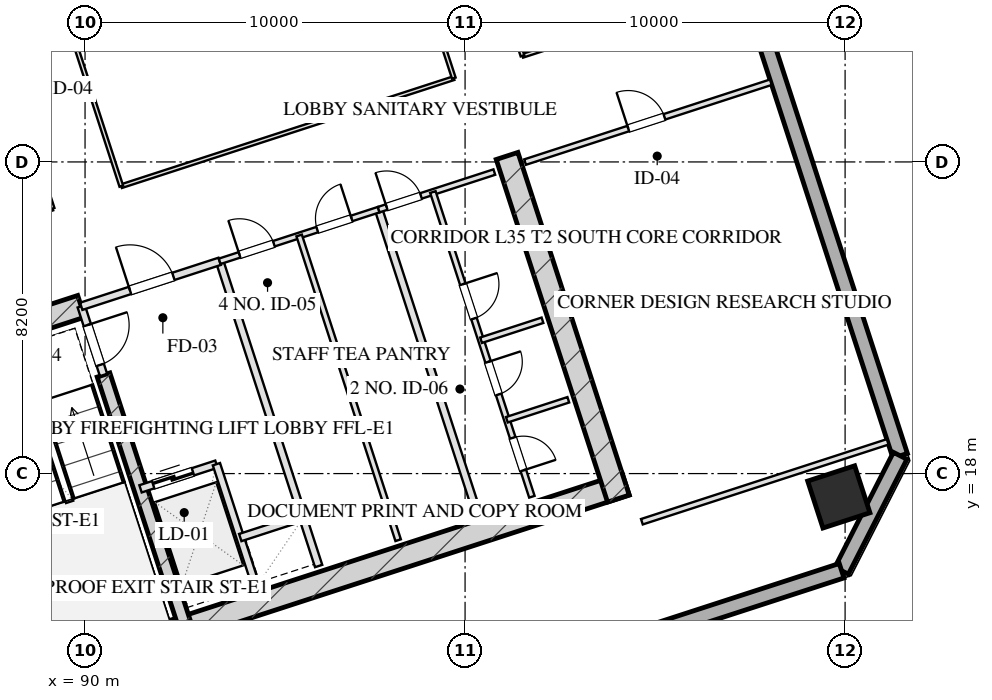
"""IFC4 building model, lengths in metres.
Left out: names, types, materials, properties, quantities, classifications, styles, units other than length and angle.
Written with IfcOpenShell. Run it as: python <this file> out.ifc"""

import sys

from ifc_helpers import new_model, si_unit, direction, frame, frame_2d, origin, origin_2d, place, context, subcontext, project, spatial, rectangle, hollow_rectangle, extrude, element, fill, save


model = new_model("IFC4")
c1 = context("Model", 3, precision=1e-05, world=origin(), true_north=direction((0.0, 1.0)))
c2 = subcontext(c1, "Body", "Model", "MODEL_VIEW")
j1 = project(units=[si_unit("LENGTHUNIT", "METRE"), si_unit("PLANEANGLEUNIT", "RADIAN")], contexts=[c1])
p1 = place(None, origin())
s1 = spatial("IfcSite", under=j1, at=p1, CompositionType="ELEMENT")
p2 = place(p1, origin())
s2 = spatial("IfcBuilding", under=s1, at=p2, CompositionType="ELEMENT")
p3 = place(p2, frame((0.0, 0.0, 134.55)))
s3 = spatial("IfcBuildingStorey", under=s2, at=p3, CompositionType="ELEMENT", Elevation=134.55)
p4 = place(p3, frame((88.63, 12.652, 0.0), z_axis=(0.0, 0.0, 1.0), x_axis=(0.95105714907, 0.309015046886, 0.0)))
e1 = element("IfcWall", 1, at=p4, inside=s3, PredefinedType="SHEAR", context=c2, shape_type="SweptSolid", body=[
    extrude(rectangle(XDim=16.4, YDim=0.6, at=frame_2d((8.2, 0.0))), origin(), (0.0, 0.0, 1.0), 3.45),
])
p5 = place(p3, frame((86.078, 21.475, 0.0), z_axis=(0.0, 0.0, 1.0), x_axis=(0.309017938678, -0.951056209472, 0.0)))
e2 = element("IfcWall", 2, at=p5, inside=s3, PredefinedType="SHEAR", context=c2, shape_type="SweptSolid", body=[
    extrude(rectangle(XDim=9.48, YDim=0.6, at=frame_2d((4.74, 0.0))), origin(), (0.0, 0.0, 1.0), 3.45),
])
p6 = place(p3, frame((101.105, 26.358, 0.0), z_axis=(0.0, 0.0, 1.0), x_axis=(0.309010370028, -0.95105866865, 0.0)))
e3 = element("IfcWall", 3, at=p6, inside=s3, PredefinedType="SHEAR", context=c2, shape_type="SweptSolid", body=[
    extrude(rectangle(XDim=9.48, YDim=0.6, at=frame_2d((4.74, 0.0))), origin(), (0.0, 0.0, 1.0), 3.45),
])
p7 = place(p3, frame((90.486, 20.594, 0.0), z_axis=(0.0, 0.0, 1.0), x_axis=(0.309020428229, -0.951055400562, 0.0)))
e4 = element("IfcWall", 4, at=p7, inside=s3, PredefinedType="SHEAR", context=c2, shape_type="SweptSolid", body=[
    extrude(rectangle(XDim=6.98, YDim=0.35, at=frame_2d((3.49, 0.0))), origin(), (0.0, 0.0, 1.0), 3.45),
])
p8 = place(p3, frame((85.886, 21.097, 0.0), z_axis=(0.0, 0.0, 1.0), x_axis=(0.951068073652, 0.308981422225, 0.0)))
e5 = element("IfcWall", 5, at=p8, inside=s3, PredefinedType="SHEAR", context=c2, shape_type="SweptSolid", body=[
    extrude(rectangle(XDim=4.22, YDim=0.6, at=frame_2d((2.11, 0.0))), origin(), (0.0, 0.0, 1.0), 3.45),
])
p9 = place(p3, frame((109.835, 17.386, 0.0), z_axis=(0.0, 0.0, 1.0), x_axis=(0.951056516295, 0.309016994375, 0.0)))
e6 = element("IfcColumn", 6, at=p9, inside=s3, PredefinedType="COLUMN", context=c2, shape_type="SweptSolid", body=[
    extrude(hollow_rectangle(XDim=1.3, YDim=1.3, WallThickness=0.045, at=origin_2d()), origin(), (0.0, 0.0, 1.0), 3.451),
])
p10 = place(p3, frame((98.224, 59.173, 0.0), z_axis=(0.0, 0.0, 1.0), x_axis=(0.309014228706, -0.951057414911, 0.0)))
e7 = element("IfcWall", 7, at=p10, inside=s3, PredefinedType="SOLIDWALL", context=c2, shape_type="SweptSolid", body=[
    extrude(rectangle(XDim=42.8, YDim=0.4, at=frame_2d((21.4, 0.0))), origin(), (0.0, 0.0, 1.0), 2.55),
])
p11 = place(p10, frame((18.25, 0.0, 0.0)))
e8 = element("IfcOpeningElement", 8, at=p11, cuts=e7, PredefinedType="OPENING", context=c2, shape_type="SweptSolid", body=[
    extrude(rectangle(XDim=1.1, YDim=2.15, at=frame_2d((0.55, 1.075))), frame((0.0, 0.21, 0.0), z_axis=(0.0, -1.0, 0.0), x_axis=(1.0, 0.0, 0.0)), (0.0, 0.0, 1.0), 0.42),
])
p12 = place(p3, frame((111.449, 18.468, 0.0), z_axis=(0.0, 0.0, 1.0), x_axis=(-0.454019523198, -0.890991735402, 0.0)))
e9 = element("IfcWall", 9, at=p12, inside=s3, PredefinedType="SOLIDWALL", context=c2, shape_type="SweptSolid", body=[
    extrude(rectangle(XDim=3.394, YDim=0.4, at=frame_2d((1.697, 0.0))), origin(), (0.0, 0.0, 1.0), 2.55),
])
p13 = place(p3, frame((109.908, 15.444, 0.0), z_axis=(0.0, 0.0, 1.0), x_axis=(-0.951057580055, -0.30901372044, 0.0)))
e10 = element("IfcWall", 10, at=p13, inside=s3, PredefinedType="SOLIDWALL", context=c2, shape_type="SweptSolid", body=[
    extrude(rectangle(XDim=26.4, YDim=0.4, at=frame_2d((13.2, 0.0))), origin(), (0.0, 0.0, 1.0), 2.55),
])
p14 = place(p3, frame((89.899, 22.401, 0.0), z_axis=(0.0, 0.0, 1.0), x_axis=(0.308932062672, -0.951084108086, 0.0)))
e11 = element("IfcWall", 11, at=p14, inside=s3, PredefinedType="PARTITIONING", context=c2, shape_type="SweptSolid", body=[
    extrude(rectangle(XDim=1.9, YDim=0.2, at=frame_2d((0.95, 0.0))), origin(), (0.0, 0.0, 1.0), 3.155),
])
p15 = place(p14, frame((0.52, 0.0, 0.0)))
e12 = element("IfcOpeningElement", 12, at=p15, cuts=e11, PredefinedType="OPENING", context=c2, shape_type="SweptSolid", body=[
    extrude(rectangle(XDim=1.1, YDim=2.05, at=frame_2d((0.55, 1.025))), frame((0.0, 0.11, 0.0), z_axis=(0.0, -1.0, 0.0), x_axis=(1.0, 0.0, 0.0)), (0.0, 0.0, 1.0), 0.22),
])
p16 = place(p3, frame((93.542, 23.585, 0.0), z_axis=(0.0, 0.0, 1.0), x_axis=(0.309042196757, -0.951048327176, 0.0)))
e13 = element("IfcWall", 13, at=p16, inside=s3, PredefinedType="PARTITIONING", context=c2, shape_type="SweptSolid", body=[
    extrude(rectangle(XDim=8.43, YDim=0.2, at=frame_2d((4.215, 0.0))), origin(), (0.0, 0.0, 1.0), 3.155),
])
p17 = place(p3, frame((89.899, 22.401, 0.0), z_axis=(0.0, 0.0, 1.0), x_axis=(0.951046716504, 0.309047153403, 0.0)))
e14 = element("IfcWall", 14, at=p17, inside=s3, PredefinedType="PARTITIONING", context=c2, shape_type="SweptSolid", body=[
    extrude(rectangle(XDim=3.83, YDim=0.2, at=frame_2d((1.915, 0.0))), origin(), (0.0, 0.0, 1.0), 3.155),
])
p18 = place(p17, frame((1.35, 0.0, 0.0)))
e15 = element("IfcOpeningElement", 15, at=p18, cuts=e14, PredefinedType="OPENING", context=c2, shape_type="SweptSolid", body=[
    extrude(rectangle(XDim=1.2, YDim=2.05, at=frame_2d((0.6, 1.025))), frame((0.0, 0.11, 0.0), z_axis=(0.0, -1.0, 0.0), x_axis=(1.0, 0.0, 0.0)), (0.0, 0.0, 1.0), 0.22),
])
p19 = place(p3, frame((91.46, 17.598, 0.0), z_axis=(0.0, 0.0, 1.0), x_axis=(0.951062257173, 0.308999325213, 0.0)))
e16 = element("IfcWall", 16, at=p19, inside=s3, PredefinedType="PARTITIONING", context=c2, shape_type="SweptSolid", body=[
    extrude(rectangle(XDim=2.1, YDim=0.2, at=frame_2d((1.05, 0.0))), origin(), (0.0, 0.0, 1.0), 3.155),
])
p20 = place(p19, frame((0.35, 0.0, 0.0)))
e17 = element("IfcOpeningElement", 17, at=p20, cuts=e16, PredefinedType="OPENING", context=c2, shape_type="SweptSolid", body=[
    extrude(rectangle(XDim=1.1, YDim=2.05, at=frame_2d((0.55, 1.025))), frame((0.0, 0.11, 0.0), z_axis=(0.0, -1.0, 0.0), x_axis=(1.0, 0.0, 0.0)), (0.0, 0.0, 1.0), 0.22),
])
p21 = place(p3, frame((93.457, 18.247, 0.0), z_axis=(0.0, 0.0, 1.0), x_axis=(0.3089935693, -0.951064127245, 0.0)))
e18 = element("IfcWall", 18, at=p21, inside=s3, PredefinedType="PARTITIONING", context=c2, shape_type="SweptSolid", body=[
    extrude(rectangle(XDim=3.7, YDim=0.2, at=frame_2d((1.85, 0.0))), origin(), (0.0, 0.0, 1.0), 3.155),
])
p22 = place(p3, frame((94.084, 16.317, 0.0), z_axis=(0.0, 0.0, 1.0), x_axis=(0.951041328149, 0.309063734775, 0.0)))
e19 = element("IfcWall", 19, at=p22, inside=s3, PredefinedType="PARTITIONING", context=c2, shape_type="SweptSolid", body=[
    extrude(rectangle(XDim=1.73, YDim=0.2, at=frame_2d((0.865, 0.0))), origin(), (0.0, 0.0, 1.0), 3.155),
])
p23 = place(p3, frame((97.727, 24.944, 0.0), z_axis=(0.0, 0.0, 1.0), x_axis=(0.309016001439, -0.951056838919, 0.0)))
e20 = element("IfcWall", 20, at=p23, inside=s3, PredefinedType="PARTITIONING", context=c2, shape_type="SweptSolid", body=[
    extrude(rectangle(XDim=8.43, YDim=0.2, at=frame_2d((4.215, 0.0))), origin(), (0.0, 0.0, 1.0), 3.155),
])
p24 = place(p3, frame((93.542, 23.585, 0.0), z_axis=(0.0, 0.0, 1.0), x_axis=(0.951063829732, 0.308994485023, 0.0)))
e21 = element("IfcWall", 21, at=p24, inside=s3, PredefinedType="PARTITIONING", context=c2, shape_type="SweptSolid", body=[
    extrude(rectangle(XDim=4.4, YDim=0.15, at=frame_2d((2.2, 0.0))), origin(), (0.0, 0.0, 1.0), 3.155),
])
p25 = place(p24, frame((0.55, 0.0, 0.0)))
e22 = element("IfcOpeningElement", 22, at=p25, cuts=e21, PredefinedType="OPENING", context=c2, shape_type="SweptSolid", body=[
    extrude(rectangle(XDim=0.95, YDim=2.05, at=frame_2d((0.475, 1.025))), frame((0.0, 0.085, 0.0), z_axis=(0.0, -1.0, 0.0), x_axis=(1.0, 0.0, 0.0)), (0.0, 0.0, 1.0), 0.17),
])
p26 = place(p24, frame((2.7, 0.0, 0.0)))
e23 = element("IfcOpeningElement", 23, at=p26, cuts=e21, PredefinedType="OPENING", context=c2, shape_type="SweptSolid", body=[
    extrude(rectangle(XDim=0.95, YDim=2.05, at=frame_2d((0.475, 1.025))), frame((0.0, 0.085, 0.0), z_axis=(0.0, -1.0, 0.0), x_axis=(1.0, 0.0, 0.0)), (0.0, 0.0, 1.0), 0.17),
])
p27 = place(p3, frame((95.634, 24.265, 0.0), z_axis=(0.0, 0.0, 1.0), x_axis=(0.309007490203, -0.951059604335, 0.0)))
e24 = element("IfcWall", 24, at=p27, inside=s3, PredefinedType="PARTITIONING", context=c2, shape_type="SweptSolid", body=[
    extrude(rectangle(XDim=8.43, YDim=0.15, at=frame_2d((4.215, 0.0))), origin(), (0.0, 0.0, 1.0), 3.155),
])
p28 = place(p3, frame((97.727, 24.944, 0.0), z_axis=(0.0, 0.0, 1.0), x_axis=(0.951036872128, 0.309077446369, 0.0)))
e25 = element("IfcWall", 25, at=p28, inside=s3, PredefinedType="PARTITIONING", context=c2, shape_type="SweptSolid", body=[
    extrude(rectangle(XDim=3.2, YDim=0.15, at=frame_2d((1.6, 0.0))), origin(), (0.0, 0.0, 1.0), 3.155),
])
p29 = place(p28, frame((0.22, 0.0, 0.0)))
e26 = element("IfcOpeningElement", 26, at=p29, cuts=e25, PredefinedType="OPENING", context=c2, shape_type="SweptSolid", body=[
    extrude(rectangle(XDim=0.95, YDim=2.05, at=frame_2d((0.475, 1.025))), frame((0.0, 0.085, 0.0), z_axis=(0.0, -1.0, 0.0), x_axis=(1.0, 0.0, 0.0)), (0.0, 0.0, 1.0), 0.17),
])
p30 = place(p3, frame((99.153, 25.408, 0.0), z_axis=(0.0, 0.0, 1.0), x_axis=(0.309016001439, -0.951056838919, 0.0)))
e27 = element("IfcWall", 27, at=p30, inside=s3, PredefinedType="PARTITIONING", context=c2, shape_type="SweptSolid", body=[
    extrude(rectangle(XDim=8.43, YDim=0.15, at=frame_2d((4.215, 0.0))), origin(), (0.0, 0.0, 1.0), 3.155),
])
p31 = place(p30, frame((2.55, 0.0, 0.0)))
e28 = element("IfcOpeningElement", 28, at=p31, cuts=e27, PredefinedType="OPENING", context=c2, shape_type="SweptSolid", body=[
    extrude(rectangle(XDim=0.95, YDim=2.05, at=frame_2d((0.475, 1.025))), frame((0.0, 0.085, 0.0), z_axis=(0.0, -1.0, 0.0), x_axis=(1.0, 0.0, 0.0)), (0.0, 0.0, 1.0), 0.17),
])
p32 = place(p30, frame((4.7, 0.0, 0.0)))
e29 = element("IfcOpeningElement", 29, at=p32, cuts=e27, PredefinedType="OPENING", context=c2, shape_type="SweptSolid", body=[
    extrude(rectangle(XDim=0.9, YDim=2.05, at=frame_2d((0.45, 1.025))), frame((0.0, 0.085, 0.0), z_axis=(0.0, -1.0, 0.0), x_axis=(1.0, 0.0, 0.0)), (0.0, 0.0, 1.0), 0.17),
])
p33 = place(p30, frame((6.8, 0.0, 0.0)))
e30 = element("IfcOpeningElement", 30, at=p33, cuts=e27, PredefinedType="OPENING", context=c2, shape_type="SweptSolid", body=[
    extrude(rectangle(XDim=0.9, YDim=2.05, at=frame_2d((0.45, 1.025))), frame((0.0, 0.085, 0.0), z_axis=(0.0, -1.0, 0.0), x_axis=(1.0, 0.0, 0.0)), (0.0, 0.0, 1.0), 0.17),
])
p34 = place(p3, frame((100.42, 21.509, 0.0), z_axis=(0.0, 0.0, 1.0), x_axis=(0.951040401051, 0.309066587596, 0.0)))
e31 = element("IfcWall", 31, at=p34, inside=s3, PredefinedType="PARTITIONING", context=c2, shape_type="SweptSolid", body=[
    extrude(rectangle(XDim=1.7, YDim=0.15, at=frame_2d((0.85, 0.0))), origin(), (0.0, 0.0, 1.0), 3.155),
])
p35 = place(p3, frame((101.1, 19.416, 0.0), z_axis=(0.0, 0.0, 1.0), x_axis=(0.951054116971, 0.309024378638, 0.0)))
e32 = element("IfcWall", 32, at=p35, inside=s3, PredefinedType="PARTITIONING", context=c2, shape_type="SweptSolid", body=[
    extrude(rectangle(XDim=1.7, YDim=0.15, at=frame_2d((0.85, 0.0))), origin(), (0.0, 0.0, 1.0), 3.155),
])
p36 = place(p3, frame((104.653, 16.733, 0.0), z_axis=(0.0, 0.0, 1.0), x_axis=(0.951054383043, 0.309023559774, 0.0)))
e33 = element("IfcWall", 33, at=p36, inside=s3, PredefinedType="PARTITIONING", context=c2, shape_type="SweptSolid", body=[
    extrude(rectangle(XDim=6.8, YDim=0.15, at=frame_2d((3.4, 0.0))), origin(), (0.0, 0.0, 1.0), 3.155),
])
p37 = place(p3, frame((101.578, 26.196, 0.0), z_axis=(0.0, 0.0, 1.0), x_axis=(0.951064934653, 0.308991084134, 0.0)))
e34 = element("IfcWall", 34, at=p37, inside=s3, PredefinedType="PARTITIONING", context=c2, shape_type="SweptSolid", body=[
    extrude(rectangle(XDim=6.8, YDim=0.15, at=frame_2d((3.4, 0.0))), origin(), (0.0, 0.0, 1.0), 3.155),
])
p38 = place(p37, frame((2.856, 0.0, 0.0)))
e35 = element("IfcOpeningElement", 35, at=p38, cuts=e34, PredefinedType="OPENING", context=c2, shape_type="SweptSolid", body=[
    extrude(rectangle(XDim=1.0, YDim=2.05, at=frame_2d((0.5, 1.025))), frame((0.0, 0.085, 0.0), z_axis=(0.0, -1.0, 0.0), x_axis=(1.0, 0.0, 0.0)), (0.0, 0.0, 1.0), 0.17),
])
p39 = place(p3, frame((77.925, 21.328, 0.0), z_axis=(0.0, 0.0, 1.0), x_axis=(0.951053984761, 0.309024785528, 0.0)))
e36 = element("IfcWall", 36, at=p39, inside=s3, PredefinedType="MOVABLE", context=c2, shape_type="SweptSolid", body=[
    extrude(rectangle(XDim=11.8, YDim=0.1, at=frame_2d((5.9, 0.0))), origin(), (0.0, 0.0, 1.0), 3.155),
])
p40 = place(p3, frame((90.954, 25.562, 0.0), z_axis=(0.0, 0.0, 1.0), x_axis=(0.951052398814, 0.309029666393, 0.0)))
e37 = element("IfcWall", 37, at=p40, inside=s3, PredefinedType="MOVABLE", context=c2, shape_type="SweptSolid", body=[
    extrude(rectangle(XDim=9.2, YDim=0.1, at=frame_2d((4.6, 0.0))), origin(), (0.0, 0.0, 1.0), 3.155),
])
p41 = place(p3, frame((101.511, 28.992, 0.0), z_axis=(0.0, 0.0, 1.0), x_axis=(0.951048719763, 0.309040988602, 0.0)))
e38 = element("IfcWall", 38, at=p41, inside=s3, PredefinedType="MOVABLE", context=c2, shape_type="SweptSolid", body=[
    extrude(rectangle(XDim=6.0, YDim=0.1, at=frame_2d((3.0, 0.0))), origin(), (0.0, 0.0, 1.0), 3.155),
])
p42 = place(p3, frame((89.147, 24.975, 0.0), z_axis=(0.0, 0.0, 1.0), x_axis=(-0.309022042254, 0.951054876125, 0.0)))
e39 = element("IfcWall", 39, at=p42, inside=s3, PredefinedType="MOVABLE", context=c2, shape_type="SweptSolid", body=[
    extrude(rectangle(XDim=16.64, YDim=0.1, at=frame_2d((8.32, 0.0))), origin(), (0.0, 0.0, 1.0), 3.155),
])
p43 = place(p42, frame((3.32, 0.0, 0.0)))
e40 = element("IfcOpeningElement", 40, at=p43, cuts=e39, PredefinedType="OPENING", context=c2, shape_type="SweptSolid", body=[
    extrude(rectangle(XDim=1.0, YDim=2.05, at=frame_2d((0.5, 1.025))), frame((0.0, 0.06, 0.0), z_axis=(0.0, -1.0, 0.0), x_axis=(1.0, 0.0, 0.0)), (0.0, 0.0, 1.0), 0.12),
])
p44 = place(p42, frame((11.64, 0.0, 0.0)))
e41 = element("IfcOpeningElement", 41, at=p44, cuts=e39, PredefinedType="OPENING", context=c2, shape_type="SweptSolid", body=[
    extrude(rectangle(XDim=1.0, YDim=2.05, at=frame_2d((0.5, 1.025))), frame((0.0, 0.06, 0.0), z_axis=(0.0, -1.0, 0.0), x_axis=(1.0, 0.0, 0.0)), (0.0, 0.0, 1.0), 0.12),
])
p45 = place(p3, frame((90.954, 25.562, 0.0), z_axis=(0.0, 0.0, 1.0), x_axis=(-0.30901773025, 0.951056277195, 0.0)))
e42 = element("IfcWall", 42, at=p45, inside=s3, PredefinedType="MOVABLE", context=c2, shape_type="SweptSolid", body=[
    extrude(rectangle(XDim=16.64, YDim=0.1, at=frame_2d((8.32, 0.0))), origin(), (0.0, 0.0, 1.0), 3.155),
])
p46 = place(p45, frame((4.284, 0.0, 0.0)))
e43 = element("IfcOpeningElement", 43, at=p46, cuts=e42, PredefinedType="OPENING", context=c2, shape_type="SweptSolid", body=[
    extrude(rectangle(XDim=1.1, YDim=2.05, at=frame_2d((0.55, 1.025))), frame((0.0, 0.06, 0.0), z_axis=(0.0, -1.0, 0.0), x_axis=(1.0, 0.0, 0.0)), (0.0, 0.0, 1.0), 0.12),
])
p47 = place(p45, frame((12.724, 0.0, 0.0)))
e44 = element("IfcOpeningElement", 44, at=p47, cuts=e42, PredefinedType="OPENING", context=c2, shape_type="SweptSolid", body=[
    extrude(rectangle(XDim=1.1, YDim=2.05, at=frame_2d((0.55, 1.025))), frame((0.0, 0.06, 0.0), z_axis=(0.0, -1.0, 0.0), x_axis=(1.0, 0.0, 0.0)), (0.0, 0.0, 1.0), 0.12),
])
p48 = place(p3, frame((99.704, 28.405, 0.0), z_axis=(0.0, 0.0, 1.0), x_axis=(-0.309004459387, 0.951060589068, 0.0)))
e45 = element("IfcWall", 45, at=p48, inside=s3, PredefinedType="MOVABLE", context=c2, shape_type="SweptSolid", body=[
    extrude(rectangle(XDim=16.64, YDim=0.1, at=frame_2d((8.32, 0.0))), origin(), (0.0, 0.0, 1.0), 3.155),
])
p49 = place(p3, frame((101.511, 28.992, 0.0), z_axis=(0.0, 0.0, 1.0), x_axis=(-0.30901773025, 0.951056277195, 0.0)))
e46 = element("IfcWall", 46, at=p49, inside=s3, PredefinedType="MOVABLE", context=c2, shape_type="SweptSolid", body=[
    extrude(rectangle(XDim=16.64, YDim=0.1, at=frame_2d((8.32, 0.0))), origin(), (0.0, 0.0, 1.0), 3.155),
])
p50 = place(p49, frame((1.16, 0.0, 0.0)))
e47 = element("IfcOpeningElement", 47, at=p50, cuts=e46, PredefinedType="OPENING", context=c2, shape_type="SweptSolid", body=[
    extrude(rectangle(XDim=1.0, YDim=2.05, at=frame_2d((0.5, 1.025))), frame((0.0, 0.06, 0.0), z_axis=(0.0, -1.0, 0.0), x_axis=(1.0, 0.0, 0.0)), (0.0, 0.0, 1.0), 0.12),
])
p51 = place(p49, frame((6.16, 0.0, 0.0)))
e48 = element("IfcOpeningElement", 48, at=p51, cuts=e46, PredefinedType="OPENING", context=c2, shape_type="SweptSolid", body=[
    extrude(rectangle(XDim=1.0, YDim=2.05, at=frame_2d((0.5, 1.025))), frame((0.0, 0.06, 0.0), z_axis=(0.0, -1.0, 0.0), x_axis=(1.0, 0.0, 0.0)), (0.0, 0.0, 1.0), 0.12),
])
p52 = place(p49, frame((10.16, 0.0, 0.0)))
e49 = element("IfcOpeningElement", 49, at=p52, cuts=e46, PredefinedType="OPENING", context=c2, shape_type="SweptSolid", body=[
    extrude(rectangle(XDim=1.05, YDim=2.05, at=frame_2d((0.525, 1.025))), frame((0.0, 0.06, 0.0), z_axis=(0.0, -1.0, 0.0), x_axis=(1.0, 0.0, 0.0)), (0.0, 0.0, 1.0), 0.12),
])
p53 = place(p49, frame((14.48, 0.0, 0.0)))
e50 = element("IfcOpeningElement", 50, at=p53, cuts=e46, PredefinedType="OPENING", context=c2, shape_type="SweptSolid", body=[
    extrude(rectangle(XDim=0.85, YDim=2.05, at=frame_2d((0.425, 1.025))), frame((0.0, 0.06, 0.0), z_axis=(0.0, -1.0, 0.0), x_axis=(1.0, 0.0, 0.0)), (0.0, 0.0, 1.0), 0.12),
])
p54 = place(p15, origin())
e51 = element("IfcDoor", 51, at=p54, inside=s3, OperationType="SINGLE_SWING_LEFT", PredefinedType="DOOR", context=c2, shape_type="SweptSolid", body=[
    extrude(rectangle(XDim=1.1, YDim=2.05, at=frame_2d((0.55, 1.025))), frame((0.0, 0.025, 0.0), z_axis=(0.0, -1.0, 0.0), x_axis=(1.0, 0.0, 0.0)), (0.0, 0.0, 1.0), 0.05),
])
fill(e12, e51)
p55 = place(p18, origin())
e52 = element("IfcDoor", 52, at=p55, inside=s3, OperationType="SINGLE_SWING_LEFT", PredefinedType="DOOR", context=c2, shape_type="SweptSolid", body=[
    extrude(rectangle(XDim=1.2, YDim=2.05, at=frame_2d((0.6, 1.025))), frame((0.0, 0.025, 0.0), z_axis=(0.0, -1.0, 0.0), x_axis=(1.0, 0.0, 0.0)), (0.0, 0.0, 1.0), 0.05),
])
fill(e15, e52)
p56 = place(p20, origin())
e53 = element("IfcDoor", 53, at=p56, inside=s3, OperationType="DOUBLE_DOOR_SLIDING", PredefinedType="DOOR", context=c2, shape_type="SweptSolid", body=[
    extrude(rectangle(XDim=1.1, YDim=2.05, at=frame_2d((0.55, 1.025))), frame((0.0, 0.025, 0.0), z_axis=(0.0, -1.0, 0.0), x_axis=(1.0, 0.0, 0.0)), (0.0, 0.0, 1.0), 0.05),
])
fill(e17, e53)
p57 = place(p25, origin())
e54 = element("IfcDoor", 54, at=p57, inside=s3, OperationType="SINGLE_SWING_LEFT", PredefinedType="DOOR", context=c2, shape_type="SweptSolid", body=[
    extrude(rectangle(XDim=0.95, YDim=2.05, at=frame_2d((0.475, 1.025))), frame((0.0, 0.025, 0.0), z_axis=(0.0, -1.0, 0.0), x_axis=(1.0, 0.0, 0.0)), (0.0, 0.0, 1.0), 0.05),
])
fill(e22, e54)
p58 = place(p26, origin())
e55 = element("IfcDoor", 55, at=p58, inside=s3, OperationType="SINGLE_SWING_RIGHT", PredefinedType="DOOR", context=c2, shape_type="SweptSolid", body=[
    extrude(rectangle(XDim=0.95, YDim=2.05, at=frame_2d((0.475, 1.025))), frame((0.0, 0.025, 0.0), z_axis=(0.0, -1.0, 0.0), x_axis=(1.0, 0.0, 0.0)), (0.0, 0.0, 1.0), 0.05),
])
fill(e23, e55)
p59 = place(p29, origin())
e56 = element("IfcDoor", 56, at=p59, inside=s3, OperationType="SINGLE_SWING_LEFT", PredefinedType="DOOR", context=c2, shape_type="SweptSolid", body=[
    extrude(rectangle(XDim=0.95, YDim=2.05, at=frame_2d((0.475, 1.025))), frame((0.0, 0.025, 0.0), z_axis=(0.0, -1.0, 0.0), x_axis=(1.0, 0.0, 0.0)), (0.0, 0.0, 1.0), 0.05),
])
fill(e26, e56)
p60 = place(p31, origin())
e57 = element("IfcDoor", 57, at=p60, inside=s3, OperationType="SINGLE_SWING_LEFT", PredefinedType="DOOR", context=c2, shape_type="SweptSolid", body=[
    extrude(rectangle(XDim=0.95, YDim=2.05, at=frame_2d((0.475, 1.025))), frame((0.0, 0.025, 0.0), z_axis=(0.0, -1.0, 0.0), x_axis=(1.0, 0.0, 0.0)), (0.0, 0.0, 1.0), 0.05),
])
fill(e28, e57)
p61 = place(p32, origin())
e58 = element("IfcDoor", 58, at=p61, inside=s3, OperationType="SINGLE_SWING_LEFT", PredefinedType="DOOR", context=c2, shape_type="SweptSolid", body=[
    extrude(rectangle(XDim=0.9, YDim=2.05, at=frame_2d((0.45, 1.025))), frame((0.0, 0.025, 0.0), z_axis=(0.0, -1.0, 0.0), x_axis=(1.0, 0.0, 0.0)), (0.0, 0.0, 1.0), 0.05),
])
fill(e29, e58)
p62 = place(p33, origin())
e59 = element("IfcDoor", 59, at=p62, inside=s3, OperationType="SINGLE_SWING_RIGHT", PredefinedType="DOOR", context=c2, shape_type="SweptSolid", body=[
    extrude(rectangle(XDim=0.9, YDim=2.05, at=frame_2d((0.45, 1.025))), frame((0.0, 0.025, 0.0), z_axis=(0.0, -1.0, 0.0), x_axis=(1.0, 0.0, 0.0)), (0.0, 0.0, 1.0), 0.05),
])
fill(e30, e59)
p63 = place(p38, origin())
e60 = element("IfcDoor", 60, at=p63, inside=s3, OperationType="SINGLE_SWING_LEFT", PredefinedType="DOOR", context=c2, shape_type="SweptSolid", body=[
    extrude(rectangle(XDim=1.0, YDim=2.05, at=frame_2d((0.5, 1.025))), frame((0.0, 0.025, 0.0), z_axis=(0.0, -1.0, 0.0), x_axis=(1.0, 0.0, 0.0)), (0.0, 0.0, 1.0), 0.05),
])
fill(e35, e60)
save(model, sys.argv[1])
